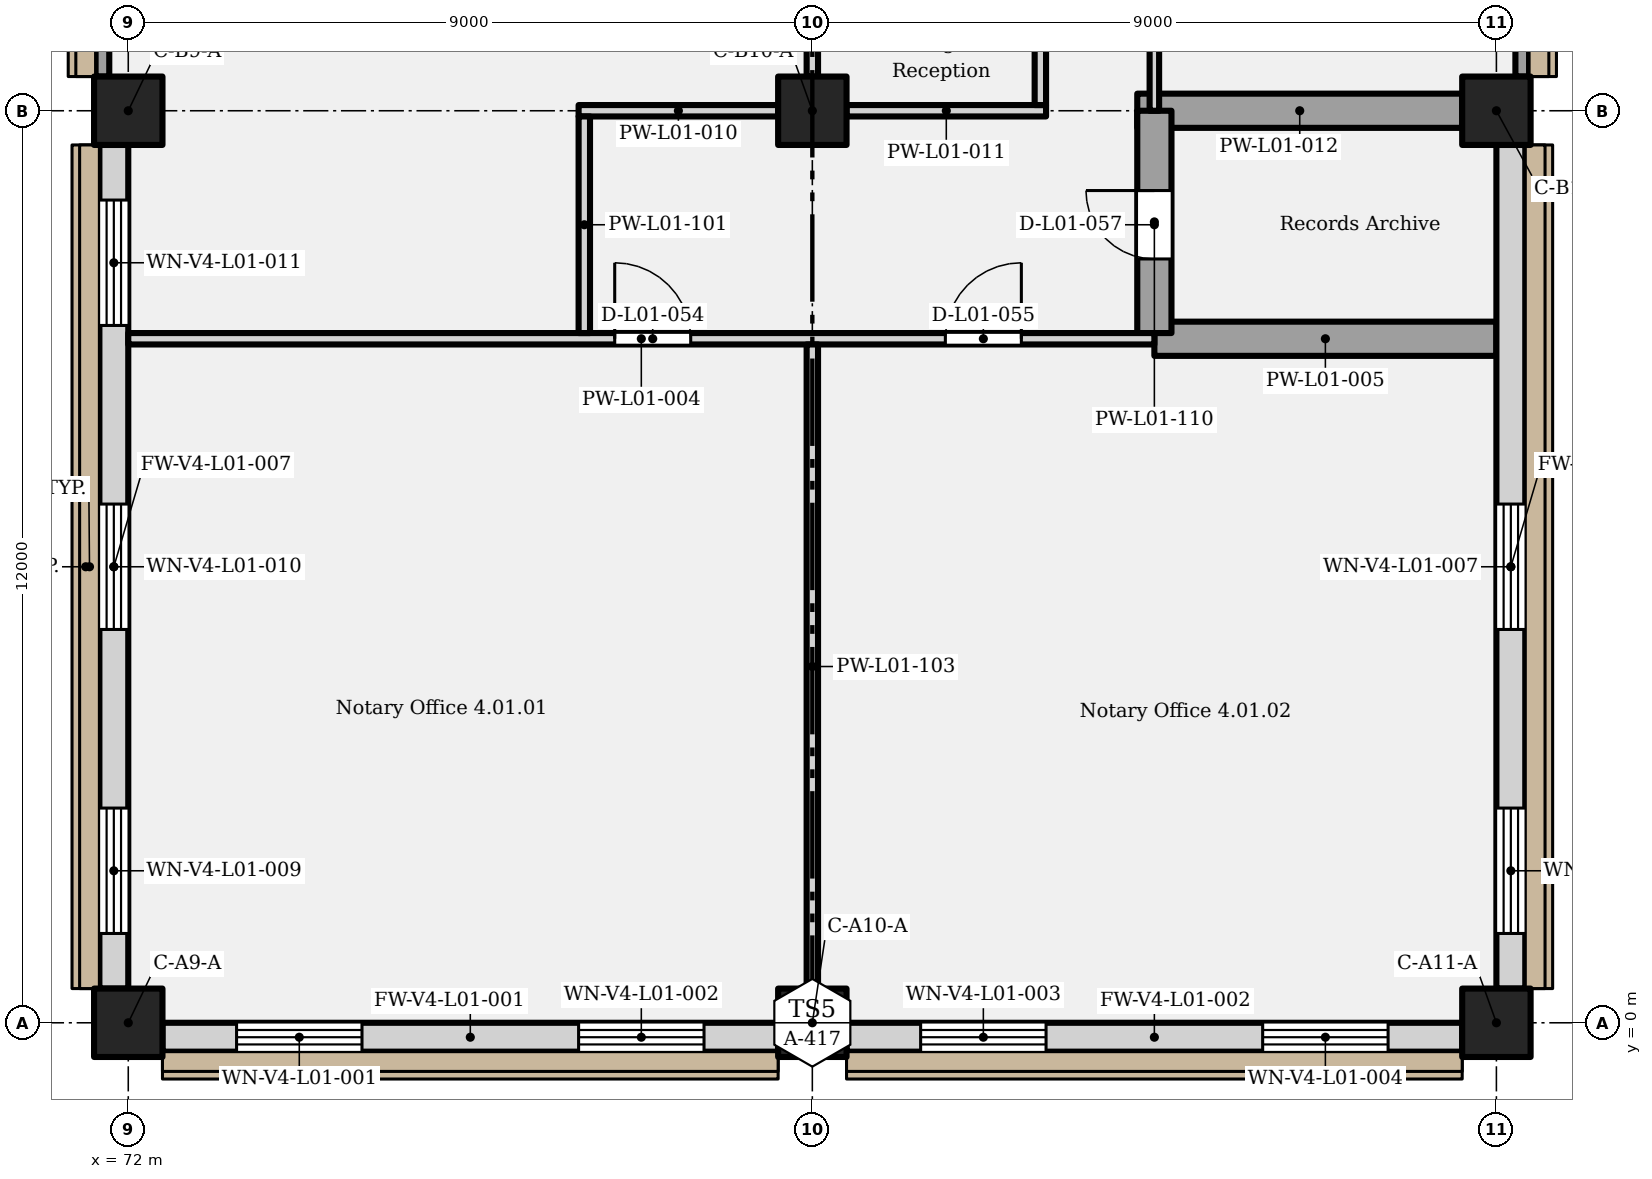
"""IFC4 building model, lengths in metres.
Left out: names, types, materials, properties, quantities, classifications, styles, units other than length and angle.
Written with IfcOpenShell. Run it as: python <this file> out.ifc"""

import sys

from ifc_helpers import new_model, si_unit, direction, frame, frame_2d, origin, origin_2d, place, context, subcontext, project, spatial, rectangle, extrude, element, fill, save


model = new_model("IFC4")
c1 = context("Model", 3, precision=1e-05, world=origin(), true_north=direction((0.0, 1.0)))
c2 = subcontext(c1, "Body", "Model", "MODEL_VIEW")
j1 = project(units=[si_unit("LENGTHUNIT", "METRE"), si_unit("PLANEANGLEUNIT", "RADIAN")], contexts=[c1])
p1 = place(None, origin())
s1 = spatial("IfcSite", under=j1, at=p1, CompositionType="ELEMENT")
p2 = place(p1, origin())
s2 = spatial("IfcBuilding", under=s1, at=p2, CompositionType="ELEMENT")
p3 = place(p2, frame((0.0, 0.0, 6.6)))
s3 = spatial("IfcBuildingStorey", under=s2, at=p3, CompositionType="ELEMENT", Elevation=6.6)
for number, where, z_axis, x_axis in (
    (1, (72.0, 0.0, 0.0), (0.0, 0.0, 1.0), (1.0, 0.0, 0.0)),
    (2, (81.0, 0.0, 0.0), (0.0, 0.0, 1.0), (1.0, 0.0, 0.0)),
    (3, (90.0, 0.0, 0.0), (0.0, 0.0, 1.0), (1.0, 0.0, 0.0)),
    (4, (72.0, 12.0, 0.0), (0.0, 0.0, 1.0), (1.0, 0.0, 0.0)),
    (5, (81.0, 12.0, 0.0), (0.0, 0.0, 1.0), (1.0, 0.0, 0.0)),
    (6, (90.0, 12.0, 0.0), (0.0, 0.0, 1.0), (1.0, 0.0, 0.0)),
):
    element("IfcColumn", number, at=place(p3, frame(where, z_axis=z_axis, x_axis=x_axis)), inside=s3, PredefinedType="COLUMN", context=c2, shape_type="SweptSolid", body=[
        extrude(rectangle(XDim=0.9, YDim=0.9, at=origin_2d()), origin(), (0.0, 0.0, 1.0), 5.202),
    ])
p4 = place(p3, frame((72.45, -0.19, 0.0), z_axis=(0.0, 0.0, 1.0), x_axis=(1.0, 0.0, 0.0)))
e7 = element("IfcWall", 7, at=p4, inside=s3, PredefinedType="SOLIDWALL", context=c2, shape_type="SweptSolid", body=[
    extrude(rectangle(XDim=8.1, YDim=0.38, at=frame_2d((4.05, 0.0))), origin(), (0.0, 0.0, 1.0), 4.952),
])
p5 = place(p4, frame((0.975, 0.0, 1.05)))
e8 = element("IfcOpeningElement", 8, at=p5, cuts=e7, PredefinedType="OPENING", context=c2, shape_type="SweptSolid", body=[
    extrude(rectangle(XDim=1.65, YDim=2.1, at=frame_2d((0.825, 1.05))), frame((0.0, 0.2, 0.0), z_axis=(0.0, -1.0, 0.0), x_axis=(1.0, 0.0, 0.0)), (0.0, 0.0, 1.0), 0.4),
])
p6 = place(p4, frame((5.475, 0.0, 1.05)))
e9 = element("IfcOpeningElement", 9, at=p6, cuts=e7, PredefinedType="OPENING", context=c2, shape_type="SweptSolid", body=[
    extrude(rectangle(XDim=1.65, YDim=2.1, at=frame_2d((0.825, 1.05))), frame((0.0, 0.2, 0.0), z_axis=(0.0, -1.0, 0.0), x_axis=(1.0, 0.0, 0.0)), (0.0, 0.0, 1.0), 0.4),
])
p7 = place(p3, frame((81.45, -0.19, 0.0), z_axis=(0.0, 0.0, 1.0), x_axis=(1.0, 0.0, 0.0)))
e10 = element("IfcWall", 10, at=p7, inside=s3, PredefinedType="SOLIDWALL", context=c2, shape_type="SweptSolid", body=[
    extrude(rectangle(XDim=8.1, YDim=0.38, at=frame_2d((4.05, 0.0))), origin(), (0.0, 0.0, 1.0), 4.952),
])
p8 = place(p7, frame((0.975, 0.0, 1.05)))
e11 = element("IfcOpeningElement", 11, at=p8, cuts=e10, PredefinedType="OPENING", context=c2, shape_type="SweptSolid", body=[
    extrude(rectangle(XDim=1.65, YDim=2.1, at=frame_2d((0.825, 1.05))), frame((0.0, 0.2, 0.0), z_axis=(0.0, -1.0, 0.0), x_axis=(1.0, 0.0, 0.0)), (0.0, 0.0, 1.0), 0.4),
])
p9 = place(p7, frame((5.475, 0.0, 1.05)))
e12 = element("IfcOpeningElement", 12, at=p9, cuts=e10, PredefinedType="OPENING", context=c2, shape_type="SweptSolid", body=[
    extrude(rectangle(XDim=1.65, YDim=2.1, at=frame_2d((0.825, 1.05))), frame((0.0, 0.2, 0.0), z_axis=(0.0, -1.0, 0.0), x_axis=(1.0, 0.0, 0.0)), (0.0, 0.0, 1.0), 0.4),
])
p10 = place(p3, frame((90.19, 0.45, 0.0), z_axis=(0.0, 0.0, 1.0), x_axis=(0.0, 1.0, 0.0)))
e13 = element("IfcWall", 13, at=p10, inside=s3, PredefinedType="SOLIDWALL", context=c2, shape_type="SweptSolid", body=[
    extrude(rectangle(XDim=11.1, YDim=0.38, at=frame_2d((5.55, 0.0))), origin(), (0.0, 0.0, 1.0), 4.952),
])
p11 = place(p10, frame((0.725, 0.0, 1.05)))
e14 = element("IfcOpeningElement", 14, at=p11, cuts=e13, PredefinedType="OPENING", context=c2, shape_type="SweptSolid", body=[
    extrude(rectangle(XDim=1.65, YDim=2.1, at=frame_2d((0.825, 1.05))), frame((0.0, 0.2, 0.0), z_axis=(0.0, -1.0, 0.0), x_axis=(1.0, 0.0, 0.0)), (0.0, 0.0, 1.0), 0.4),
])
p12 = place(p10, frame((4.725, 0.0, 1.05)))
e15 = element("IfcOpeningElement", 15, at=p12, cuts=e13, PredefinedType="OPENING", context=c2, shape_type="SweptSolid", body=[
    extrude(rectangle(XDim=1.65, YDim=2.1, at=frame_2d((0.825, 1.05))), frame((0.0, 0.2, 0.0), z_axis=(0.0, -1.0, 0.0), x_axis=(1.0, 0.0, 0.0)), (0.0, 0.0, 1.0), 0.4),
])
p13 = place(p3, frame((90.34, 12.45, 0.0), z_axis=(0.0, 0.0, 1.0), x_axis=(0.0, 1.0, 0.0)))
e16 = element("IfcWall", 16, at=p13, inside=s3, PredefinedType="SOLIDWALL", context=c2, shape_type="SweptSolid", body=[
    extrude(rectangle(XDim=15.6, YDim=0.18, at=frame_2d((7.8, 0.0))), origin(), (0.0, 0.0, 1.0), 4.952),
])
p14 = place(p13, frame((0.413, 0.0, 0.9)))
e17 = element("IfcOpeningElement", 17, at=p14, cuts=e16, PredefinedType="OPENING", context=c2, shape_type="SweptSolid", body=[
    extrude(rectangle(XDim=2.4, YDim=2.85, at=frame_2d((1.2, 1.425))), frame((0.0, 0.1, 0.0), z_axis=(0.0, -1.0, 0.0), x_axis=(1.0, 0.0, 0.0)), (0.0, 0.0, 1.0), 0.2),
])
p15 = place(p3, frame((71.81, 0.45, 0.0), z_axis=(0.0, 0.0, 1.0), x_axis=(0.0, 1.0, 0.0)))
e18 = element("IfcWall", 18, at=p15, inside=s3, PredefinedType="SOLIDWALL", context=c2, shape_type="SweptSolid", body=[
    extrude(rectangle(XDim=11.1, YDim=0.38, at=frame_2d((5.55, 0.0))), origin(), (0.0, 0.0, 1.0), 4.952),
])
p16 = place(p15, frame((0.725, 0.0, 1.05)))
e19 = element("IfcOpeningElement", 19, at=p16, cuts=e18, PredefinedType="OPENING", context=c2, shape_type="SweptSolid", body=[
    extrude(rectangle(XDim=1.65, YDim=2.1, at=frame_2d((0.825, 1.05))), frame((0.0, 0.2, 0.0), z_axis=(0.0, -1.0, 0.0), x_axis=(1.0, 0.0, 0.0)), (0.0, 0.0, 1.0), 0.4),
])
p17 = place(p15, frame((4.725, 0.0, 1.05)))
e20 = element("IfcOpeningElement", 20, at=p17, cuts=e18, PredefinedType="OPENING", context=c2, shape_type="SweptSolid", body=[
    extrude(rectangle(XDim=1.65, YDim=2.1, at=frame_2d((0.825, 1.05))), frame((0.0, 0.2, 0.0), z_axis=(0.0, -1.0, 0.0), x_axis=(1.0, 0.0, 0.0)), (0.0, 0.0, 1.0), 0.4),
])
p18 = place(p15, frame((8.725, 0.0, 1.05)))
e21 = element("IfcOpeningElement", 21, at=p18, cuts=e18, PredefinedType="OPENING", context=c2, shape_type="SweptSolid", body=[
    extrude(rectangle(XDim=1.65, YDim=2.1, at=frame_2d((0.825, 1.05))), frame((0.0, 0.2, 0.0), z_axis=(0.0, -1.0, 0.0), x_axis=(1.0, 0.0, 0.0)), (0.0, 0.0, 1.0), 0.4),
])
p19 = place(p3, frame((71.66, 12.45, 0.0), z_axis=(0.0, 0.0, 1.0), x_axis=(0.0, 1.0, 0.0)))
e22 = element("IfcWall", 22, at=p19, inside=s3, PredefinedType="SOLIDWALL", context=c2, shape_type="SweptSolid", body=[
    extrude(rectangle(XDim=15.6, YDim=0.18, at=frame_2d((7.8, 0.0))), origin(), (0.0, 0.0, 1.0), 4.952),
])
p20 = place(p19, frame((0.375, 0.0, 1.05)))
e23 = element("IfcOpeningElement", 23, at=p20, cuts=e22, PredefinedType="OPENING", context=c2, shape_type="SweptSolid", body=[
    extrude(rectangle(XDim=1.65, YDim=2.1, at=frame_2d((0.825, 1.05))), frame((0.0, 0.1, 0.0), z_axis=(0.0, -1.0, 0.0), x_axis=(1.0, 0.0, 0.0)), (0.0, 0.0, 1.0), 0.2),
])
p21 = place(p19, frame((3.675, 0.0, 1.05)))
e24 = element("IfcOpeningElement", 24, at=p21, cuts=e22, PredefinedType="OPENING", context=c2, shape_type="SweptSolid", body=[
    extrude(rectangle(XDim=1.65, YDim=2.1, at=frame_2d((0.825, 1.05))), frame((0.0, 0.1, 0.0), z_axis=(0.0, -1.0, 0.0), x_axis=(1.0, 0.0, 0.0)), (0.0, 0.0, 1.0), 0.2),
])
p22 = place(p3, frame((72.0, 9.0, 0.0), z_axis=(0.0, 0.0, 1.0), x_axis=(1.0, 0.0, 0.0)))
e25 = element("IfcWall", 25, at=p22, inside=s3, PredefinedType="PARTITIONING", context=c2, shape_type="SweptSolid", body=[
    extrude(rectangle(XDim=13.5, YDim=0.15, at=frame_2d((6.75, 0.0))), origin(), (0.0, 0.0, 1.0), 4.952),
])
p23 = place(p22, frame((6.4, 0.0, 0.0)))
e26 = element("IfcOpeningElement", 26, at=p23, cuts=e25, PredefinedType="OPENING", context=c2, shape_type="SweptSolid", body=[
    extrude(rectangle(XDim=1.0, YDim=2.1, at=frame_2d((0.5, 1.05))), frame((0.0, 0.085, 0.0), z_axis=(0.0, -1.0, 0.0), x_axis=(1.0, 0.0, 0.0)), (0.0, 0.0, 1.0), 0.17),
])
p24 = place(p22, frame((10.75, 0.0, 0.0)))
e27 = element("IfcOpeningElement", 27, at=p24, cuts=e25, PredefinedType="OPENING", context=c2, shape_type="SweptSolid", body=[
    extrude(rectangle(XDim=1.0, YDim=2.1, at=frame_2d((0.5, 1.05))), frame((0.0, 0.085, 0.0), z_axis=(0.0, -1.0, 0.0), x_axis=(1.0, 0.0, 0.0)), (0.0, 0.0, 1.0), 0.17),
])
p25 = place(p3, frame((85.5, 9.0, 0.0), z_axis=(0.0, 0.0, 1.0), x_axis=(1.0, 0.0, 0.0)))
e28 = element("IfcWall", 28, at=p25, inside=s3, PredefinedType="PARTITIONING", context=c2, shape_type="SweptSolid", body=[
    extrude(rectangle(XDim=4.5, YDim=0.45, at=frame_2d((2.25, 0.0))), origin(), (0.0, 0.0, 1.0), 4.952),
])
for number, where, z_axis, x_axis in (
    (29, (77.925, 12.0, 0.0), (0.0, 0.0, 1.0), (1.0, 0.0, 0.0)),
    (30, (81.45, 12.0, 0.0), (0.0, 0.0, 1.0), (1.0, 0.0, 0.0)),
):
    element("IfcWall", number, at=place(p3, frame(where, z_axis=z_axis, x_axis=x_axis)), inside=s3, PredefinedType="PARTITIONING", context=c2, shape_type="SweptSolid", body=[
        extrude(rectangle(XDim=2.625, YDim=0.15, at=frame_2d((1.312, 0.0))), origin(), (0.0, 0.0, 1.0), 4.202),
    ])
p26 = place(p3, frame((85.275, 12.0, 0.0), z_axis=(0.0, 0.0, 1.0), x_axis=(1.0, 0.0, 0.0)))
e31 = element("IfcWall", 31, at=p26, inside=s3, PredefinedType="PARTITIONING", context=c2, shape_type="SweptSolid", body=[
    extrude(rectangle(XDim=4.275, YDim=0.45, at=frame_2d((2.138, 0.0))), origin(), (0.0, 0.0, 1.0), 4.202),
])
p27 = place(p3, frame((78.0, 9.075, 0.0), z_axis=(0.0, 0.0, 1.0), x_axis=(0.0, 1.0, 0.0)))
e32 = element("IfcWall", 32, at=p27, inside=s3, PredefinedType="PARTITIONING", context=c2, shape_type="SweptSolid", body=[
    extrude(rectangle(XDim=2.85, YDim=0.15, at=frame_2d((1.425, 0.0))), origin(), (0.0, 0.0, 1.0), 4.952),
])
p28 = place(p3, frame((81.0, 0.45, 0.0), z_axis=(0.0, 0.0, 1.0), x_axis=(0.0, 1.0, 0.0)))
e33 = element("IfcWall", 33, at=p28, inside=s3, PredefinedType="PARTITIONING", context=c2, shape_type="SweptSolid", body=[
    extrude(rectangle(XDim=8.475, YDim=0.15, at=frame_2d((4.238, 0.0))), origin(), (0.0, 0.0, 1.0), 4.202),
])
p29 = place(p3, frame((81.0, 12.45, 0.0), z_axis=(0.0, 0.0, 1.0), x_axis=(0.0, 1.0, 0.0)))
e34 = element("IfcWall", 34, at=p29, inside=s3, PredefinedType="PARTITIONING", context=c2, shape_type="SweptSolid", body=[
    extrude(rectangle(XDim=6.975, YDim=0.15, at=frame_2d((3.488, 0.0))), origin(), (0.0, 0.0, 1.0), 4.002),
])
p30 = place(p29, frame((5.3, 0.0, 0.0), z_axis=(0.0, 0.0, 1.0), x_axis=(-1.0, 0.0, 0.0)))
e35 = element("IfcOpeningElement", 35, at=p30, cuts=e34, PredefinedType="OPENING", context=c2, shape_type="SweptSolid", body=[
    extrude(rectangle(XDim=1.0, YDim=2.1, at=frame_2d((0.5, 1.05))), frame((0.0, 0.085, 0.0), z_axis=(0.0, -1.0, 0.0), x_axis=(1.0, 0.0, 0.0)), (0.0, 0.0, 1.0), 0.17),
])
p31 = place(p3, frame((84.0, 12.075, 0.0), z_axis=(0.0, 0.0, 1.0), x_axis=(0.0, 1.0, 0.0)))
e36 = element("IfcWall", 36, at=p31, inside=s3, PredefinedType="PARTITIONING", context=c2, shape_type="SweptSolid", body=[
    extrude(rectangle(XDim=2.85, YDim=0.15, at=frame_2d((1.425, 0.0))), origin(), (0.0, 0.0, 1.0), 4.952),
])
p32 = place(p3, frame((85.5, 9.075, 0.0), z_axis=(0.0, 0.0, 1.0), x_axis=(0.0, 1.0, 0.0)))
e37 = element("IfcWall", 37, at=p32, inside=s3, PredefinedType="PARTITIONING", context=c2, shape_type="SweptSolid", body=[
    extrude(rectangle(XDim=2.925, YDim=0.45, at=frame_2d((1.462, 0.0))), origin(), (0.0, 0.0, 1.0), 4.952),
])
p33 = place(p32, frame((0.975, 0.0, 0.0)))
e38 = element("IfcOpeningElement", 38, at=p33, cuts=e37, PredefinedType="OPENING", context=c2, shape_type="SweptSolid", body=[
    extrude(rectangle(XDim=0.9, YDim=2.1, at=frame_2d((0.45, 1.05))), frame((0.0, 0.235, 0.0), z_axis=(0.0, -1.0, 0.0), x_axis=(1.0, 0.0, 0.0)), (0.0, 0.0, 1.0), 0.47),
])
p34 = place(p3, frame((85.5, 12.0, 0.0), z_axis=(0.0, 0.0, 1.0), x_axis=(0.0, 1.0, 0.0)))
e39 = element("IfcWall", 39, at=p34, inside=s3, PredefinedType="PARTITIONING", context=c2, shape_type="SweptSolid", body=[
    extrude(rectangle(XDim=7.5, YDim=0.125, at=frame_2d((3.75, 0.0))), origin(), (0.0, 0.0, 1.0), 4.952),
])
p35 = place(p34, frame((1.4, 0.0, 0.0)))
e40 = element("IfcOpeningElement", 40, at=p35, cuts=e39, PredefinedType="OPENING", context=c2, shape_type="SweptSolid", body=[
    extrude(rectangle(XDim=0.9, YDim=2.1, at=frame_2d((0.45, 1.05))), frame((0.0, 0.073, 0.0), z_axis=(0.0, -1.0, 0.0), x_axis=(1.0, 0.0, 0.0)), (0.0, 0.0, 1.0), 0.145),
])
p36 = place(p34, frame((5.15, 0.0, 0.0)))
e41 = element("IfcOpeningElement", 41, at=p36, cuts=e39, PredefinedType="OPENING", context=c2, shape_type="SweptSolid", body=[
    extrude(rectangle(XDim=0.9, YDim=2.1, at=frame_2d((0.45, 1.05))), frame((0.0, 0.073, 0.0), z_axis=(0.0, -1.0, 0.0), x_axis=(1.0, 0.0, 0.0)), (0.0, 0.0, 1.0), 0.145),
])
p37 = place(p5, origin())
e42 = element("IfcWindow", 42, at=p37, inside=s3, PartitioningType="SINGLE_PANEL", PredefinedType="WINDOW", context=c2, shape_type="SweptSolid", body=[
    extrude(rectangle(XDim=1.65, YDim=2.1, at=frame_2d((0.825, 1.05))), frame((0.0, 0.03, 0.0), z_axis=(0.0, -1.0, 0.0), x_axis=(1.0, 0.0, 0.0)), (0.0, 0.0, 1.0), 0.06),
])
fill(e8, e42)
p38 = place(p6, origin())
e43 = element("IfcWindow", 43, at=p38, inside=s3, PartitioningType="SINGLE_PANEL", PredefinedType="WINDOW", context=c2, shape_type="SweptSolid", body=[
    extrude(rectangle(XDim=1.65, YDim=2.1, at=frame_2d((0.825, 1.05))), frame((0.0, 0.03, 0.0), z_axis=(0.0, -1.0, 0.0), x_axis=(1.0, 0.0, 0.0)), (0.0, 0.0, 1.0), 0.06),
])
fill(e9, e43)
p39 = place(p8, origin())
e44 = element("IfcWindow", 44, at=p39, inside=s3, PartitioningType="SINGLE_PANEL", PredefinedType="WINDOW", context=c2, shape_type="SweptSolid", body=[
    extrude(rectangle(XDim=1.65, YDim=2.1, at=frame_2d((0.825, 1.05))), frame((0.0, 0.03, 0.0), z_axis=(0.0, -1.0, 0.0), x_axis=(1.0, 0.0, 0.0)), (0.0, 0.0, 1.0), 0.06),
])
fill(e11, e44)
p40 = place(p9, origin())
e45 = element("IfcWindow", 45, at=p40, inside=s3, PartitioningType="SINGLE_PANEL", PredefinedType="WINDOW", context=c2, shape_type="SweptSolid", body=[
    extrude(rectangle(XDim=1.65, YDim=2.1, at=frame_2d((0.825, 1.05))), frame((0.0, 0.03, 0.0), z_axis=(0.0, -1.0, 0.0), x_axis=(1.0, 0.0, 0.0)), (0.0, 0.0, 1.0), 0.06),
])
fill(e12, e45)
p41 = place(p11, origin())
e46 = element("IfcWindow", 46, at=p41, inside=s3, PartitioningType="SINGLE_PANEL", PredefinedType="WINDOW", context=c2, shape_type="SweptSolid", body=[
    extrude(rectangle(XDim=1.65, YDim=2.1, at=frame_2d((0.825, 1.05))), frame((0.0, 0.03, 0.0), z_axis=(0.0, -1.0, 0.0), x_axis=(1.0, 0.0, 0.0)), (0.0, 0.0, 1.0), 0.06),
])
fill(e14, e46)
p42 = place(p12, origin())
e47 = element("IfcWindow", 47, at=p42, inside=s3, PartitioningType="SINGLE_PANEL", PredefinedType="WINDOW", context=c2, shape_type="SweptSolid", body=[
    extrude(rectangle(XDim=1.65, YDim=2.1, at=frame_2d((0.825, 1.05))), frame((0.0, 0.03, 0.0), z_axis=(0.0, -1.0, 0.0), x_axis=(1.0, 0.0, 0.0)), (0.0, 0.0, 1.0), 0.06),
])
fill(e15, e47)
p43 = place(p16, origin())
e48 = element("IfcWindow", 48, at=p43, inside=s3, PartitioningType="SINGLE_PANEL", PredefinedType="WINDOW", context=c2, shape_type="SweptSolid", body=[
    extrude(rectangle(XDim=1.65, YDim=2.1, at=frame_2d((0.825, 1.05))), frame((0.0, 0.03, 0.0), z_axis=(0.0, -1.0, 0.0), x_axis=(1.0, 0.0, 0.0)), (0.0, 0.0, 1.0), 0.06),
])
fill(e19, e48)
p44 = place(p17, origin())
e49 = element("IfcWindow", 49, at=p44, inside=s3, PartitioningType="SINGLE_PANEL", PredefinedType="WINDOW", context=c2, shape_type="SweptSolid", body=[
    extrude(rectangle(XDim=1.65, YDim=2.1, at=frame_2d((0.825, 1.05))), frame((0.0, 0.03, 0.0), z_axis=(0.0, -1.0, 0.0), x_axis=(1.0, 0.0, 0.0)), (0.0, 0.0, 1.0), 0.06),
])
fill(e20, e49)
p45 = place(p18, origin())
e50 = element("IfcWindow", 50, at=p45, inside=s3, PartitioningType="SINGLE_PANEL", PredefinedType="WINDOW", context=c2, shape_type="SweptSolid", body=[
    extrude(rectangle(XDim=1.65, YDim=2.1, at=frame_2d((0.825, 1.05))), frame((0.0, 0.03, 0.0), z_axis=(0.0, -1.0, 0.0), x_axis=(1.0, 0.0, 0.0)), (0.0, 0.0, 1.0), 0.06),
])
fill(e21, e50)
p46 = place(p23, origin())
e51 = element("IfcDoor", 51, at=p46, inside=s3, OperationType="SINGLE_SWING_LEFT", PredefinedType="DOOR", context=c2, shape_type="SweptSolid", body=[
    extrude(rectangle(XDim=1.0, YDim=2.1, at=frame_2d((0.5, 1.05))), frame((0.0, 0.025, 0.0), z_axis=(0.0, -1.0, 0.0), x_axis=(1.0, 0.0, 0.0)), (0.0, 0.0, 1.0), 0.05),
])
fill(e26, e51)
p47 = place(p24, origin())
e52 = element("IfcDoor", 52, at=p47, inside=s3, OperationType="SINGLE_SWING_RIGHT", PredefinedType="DOOR", context=c2, shape_type="SweptSolid", body=[
    extrude(rectangle(XDim=1.0, YDim=2.1, at=frame_2d((0.5, 1.05))), frame((0.0, 0.025, 0.0), z_axis=(0.0, -1.0, 0.0), x_axis=(1.0, 0.0, 0.0)), (0.0, 0.0, 1.0), 0.05),
])
fill(e27, e52)
p48 = place(p33, origin())
e53 = element("IfcDoor", 53, at=p48, inside=s3, OperationType="SINGLE_SWING_RIGHT", PredefinedType="DOOR", context=c2, shape_type="SweptSolid", body=[
    extrude(rectangle(XDim=0.9, YDim=2.1, at=frame_2d((0.45, 1.05))), frame((0.0, 0.025, 0.0), z_axis=(0.0, -1.0, 0.0), x_axis=(1.0, 0.0, 0.0)), (0.0, 0.0, 1.0), 0.05),
])
fill(e38, e53)
save(model, sys.argv[1])
